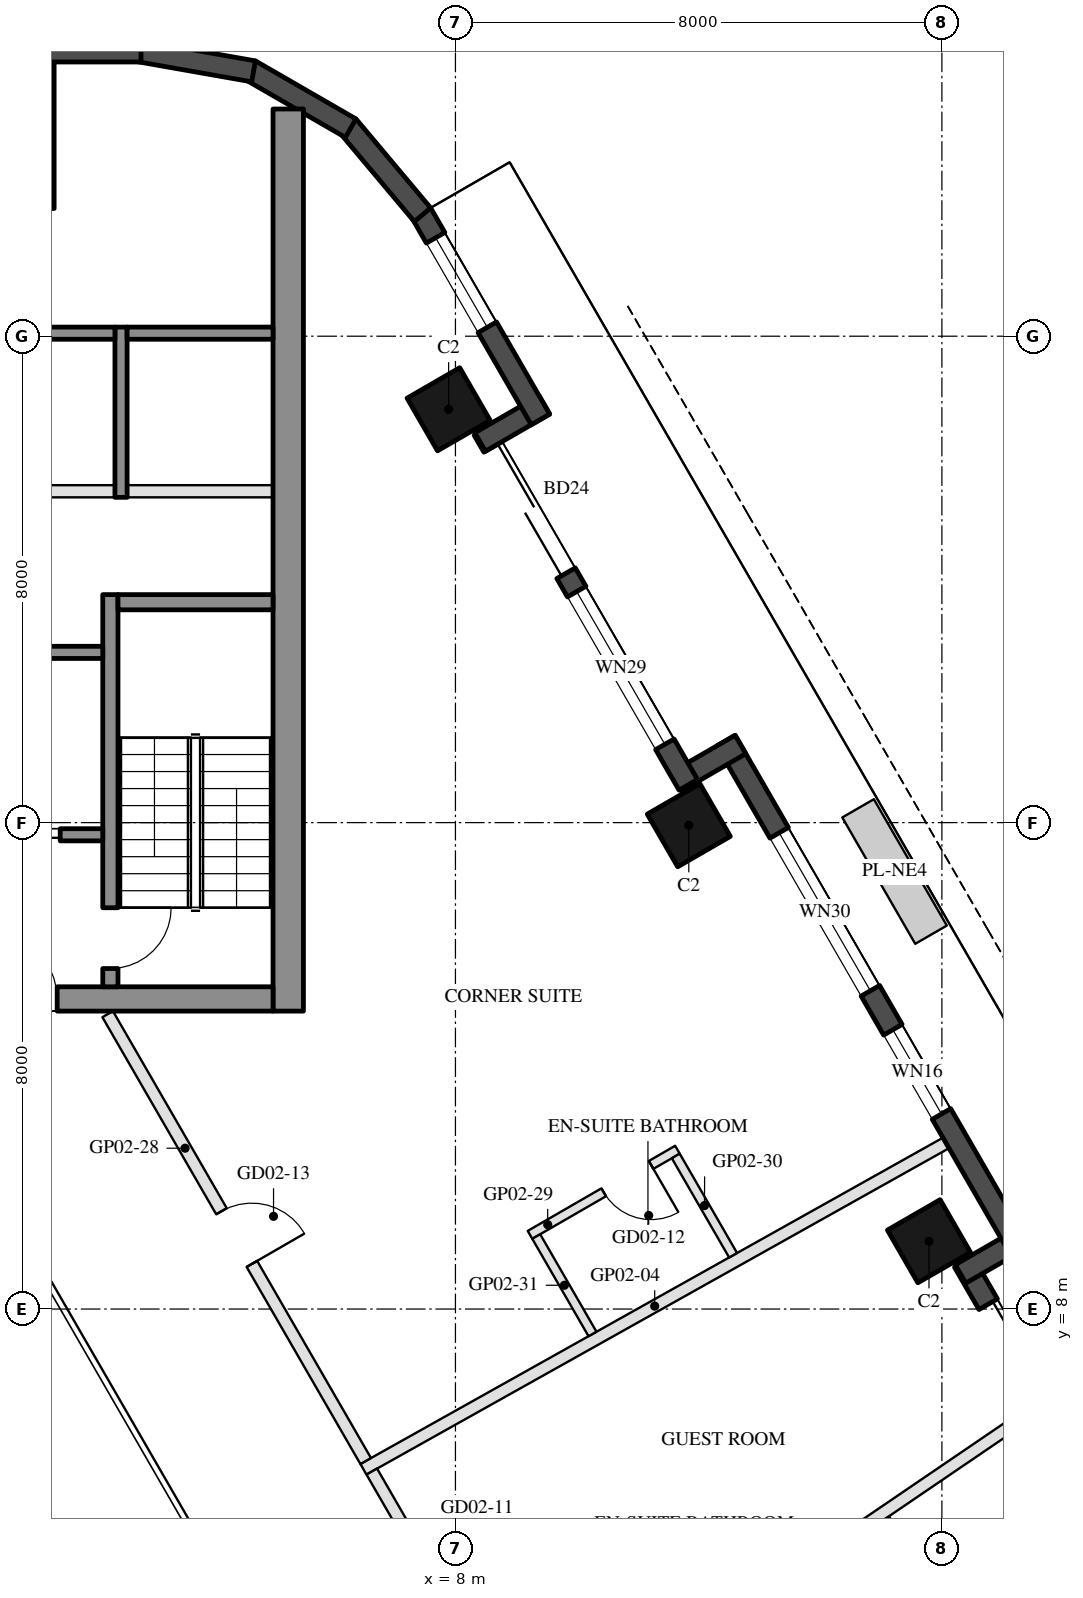
"""IFC4 building model, lengths in metres.
Left out: names, types, materials, properties, quantities, classifications, styles, units other than length and angle.
Written with IfcOpenShell. Run it as: python <this file> out.ifc"""

import sys

from ifc_helpers import new_model, si_unit, direction, frame, frame_2d, origin, origin_2d, place, context, subcontext, project, spatial, rectangle, hollow_rectangle, extrude, element, fill, save


model = new_model("IFC4")
c1 = context("Model", 3, precision=1e-05, world=origin(), true_north=direction((0.0, 1.0)))
c2 = subcontext(c1, "Body", "Model", "MODEL_VIEW")
j1 = project(units=[si_unit("LENGTHUNIT", "METRE"), si_unit("PLANEANGLEUNIT", "RADIAN")], contexts=[c1])
p1 = place(None, origin())
s1 = spatial("IfcSite", under=j1, at=p1, CompositionType="ELEMENT")
p2 = place(p1, origin())
s2 = spatial("IfcBuilding", under=s1, at=p2, CompositionType="ELEMENT")
p3 = place(p2, frame((0.0, 0.0, 57.6)))
s3 = spatial("IfcBuildingStorey", under=s2, at=p3, CompositionType="ELEMENT", Elevation=57.6)
for number, where, z_axis, x_axis in (
    (1, (15.788, 9.115, 0.0), (0.0, 0.0, 1.0), (-0.5, 0.866, 0.0)),
    (2, (11.838, 15.957, 0.0), (0.0, 0.0, 1.0), (-0.5, 0.866, 0.0)),
    (3, (7.888, 22.798, 0.0), (0.0, 0.0, 1.0), (-0.5, 0.866, 0.0)),
):
    element("IfcColumn", number, at=place(p3, frame(where, z_axis=z_axis, x_axis=x_axis)), inside=s3, PredefinedType="COLUMN", context=c2, shape_type="SweptSolid", body=[
        extrude(hollow_rectangle(XDim=1.0, YDim=1.0, WallThickness=0.045, at=origin_2d()), origin(), (0.0, 0.0, 1.0), 3.7),
    ])
p4 = place(p3, frame((0.0, 27.3, 0.0), z_axis=(0.0, 0.0, 1.0), x_axis=(1.0, 0.0, 0.0)))
e4 = element("IfcColumn", 4, at=p4, inside=s3, PredefinedType="COLUMN", context=c2, shape_type="SweptSolid", body=[
    extrude(hollow_rectangle(XDim=2.8, YDim=2.4, WallThickness=0.07, at=origin_2d()), origin(), (0.0, 0.0, 1.0), 3.7),
])
p5 = place(p3, frame((19.729, 2.938, 0.0), z_axis=(0.0, 0.0, 1.0), x_axis=(-0.499976430342, 0.866039011305, 0.0)))
e5 = element("IfcWall", 5, at=p5, inside=s3, PredefinedType="SOLIDWALL", context=c2, shape_type="SweptSolid", body=[
    extrude(rectangle(XDim=6.74, YDim=0.35, at=frame_2d((3.37, 0.0))), origin(), (0.0, 0.0, 1.0), 3.55),
])
p6 = place(p5, frame((0.77, 0.0, 0.3)))
e6 = element("IfcOpeningElement", 6, at=p6, cuts=e5, PredefinedType="OPENING", context=c2, shape_type="SweptSolid", body=[
    extrude(rectangle(XDim=2.8, YDim=2.65, at=frame_2d((1.4, 1.325))), frame((0.0, 0.185, 0.0), z_axis=(0.0, -1.0, 0.0), x_axis=(1.0, 0.0, 0.0)), (0.0, 0.0, 1.0), 0.37),
])
p7 = place(p5, frame((4.536, 0.0, 0.0)))
e7 = element("IfcOpeningElement", 7, at=p7, cuts=e5, PredefinedType="OPENING", context=c2, shape_type="SweptSolid", body=[
    extrude(rectangle(XDim=1.4, YDim=2.4, at=frame_2d((0.7, 1.2))), frame((0.0, 0.185, 0.0), z_axis=(0.0, -1.0, 0.0), x_axis=(1.0, 0.0, 0.0)), (0.0, 0.0, 1.0), 0.37),
])
p8 = place(p3, frame((16.306, 8.577, 0.0), z_axis=(0.0, 0.0, 1.0), x_axis=(0.866092288191, 0.499884134912, 0.0)))
e8 = element("IfcWall", 8, at=p8, inside=s3, PredefinedType="SOLIDWALL", context=c2, shape_type="SweptSolid", body=[
    extrude(rectangle(XDim=1.22, YDim=0.35, at=frame_2d((0.61, 0.0))), origin(), (0.0, 0.0, 1.0), 3.55),
])
p9 = place(p3, frame((17.299, 8.948, 0.0), z_axis=(0.0, 0.0, 1.0), x_axis=(-0.500010041276, 0.866019606374, 0.0)))
e9 = element("IfcWall", 9, at=p9, inside=s3, PredefinedType="SOLIDWALL", context=c2, shape_type="SweptSolid", body=[
    extrude(rectangle(XDim=9.7, YDim=0.35, at=frame_2d((4.85, 0.0))), origin(), (0.0, 0.0, 1.0), 3.55),
])
p10 = place(p9, frame((2.61, 0.0, 0.3)))
e10 = element("IfcOpeningElement", 10, at=p10, cuts=e9, PredefinedType="OPENING", context=c2, shape_type="SweptSolid", body=[
    extrude(rectangle(XDim=1.6, YDim=2.65, at=frame_2d((0.8, 1.325))), frame((0.0, 0.185, 0.0), z_axis=(0.0, -1.0, 0.0), x_axis=(1.0, 0.0, 0.0)), (0.0, 0.0, 1.0), 0.37),
])
p11 = place(p9, frame((4.949, 0.0, 0.3)))
e11 = element("IfcOpeningElement", 11, at=p11, cuts=e9, PredefinedType="OPENING", context=c2, shape_type="SweptSolid", body=[
    extrude(rectangle(XDim=3.0, YDim=2.65, at=frame_2d((1.5, 1.325))), frame((0.0, 0.185, 0.0), z_axis=(0.0, -1.0, 0.0), x_axis=(1.0, 0.0, 0.0)), (0.0, 0.0, 1.0), 0.37),
])
p12 = place(p3, frame((12.688, 17.284, 0.0), z_axis=(0.0, 0.0, 1.0), x_axis=(-0.865955602162, -0.500120880472, 0.0)))
e12 = element("IfcWall", 12, at=p12, inside=s3, PredefinedType="SOLIDWALL", context=c2, shape_type="SweptSolid", body=[
    extrude(rectangle(XDim=1.22, YDim=0.35, at=frame_2d((0.61, 0.0))), origin(), (0.0, 0.0, 1.0), 3.55),
])
p13 = place(p3, frame((11.829, 16.621, 0.0), z_axis=(0.0, 0.0, 1.0), x_axis=(-0.500003597184, 0.866023326939, 0.0)))
e13 = element("IfcWall", 13, at=p13, inside=s3, PredefinedType="SOLIDWALL", context=c2, shape_type="SweptSolid", body=[
    extrude(rectangle(XDim=6.74, YDim=0.35, at=frame_2d((3.37, 0.0))), origin(), (0.0, 0.0, 1.0), 3.55),
])
p14 = place(p13, frame((4.02, 0.0, 0.0)))
e14 = element("IfcOpeningElement", 14, at=p14, cuts=e13, PredefinedType="OPENING", context=c2, shape_type="SweptSolid", body=[
    extrude(rectangle(XDim=2.4, YDim=2.4, at=frame_2d((1.2, 1.2))), frame((0.0, 0.185, 0.0), z_axis=(0.0, -1.0, 0.0), x_axis=(1.0, 0.0, 0.0)), (0.0, 0.0, 1.0), 0.37),
])
p15 = place(p13, frame((0.77, 0.0, 0.3)))
e15 = element("IfcOpeningElement", 15, at=p15, cuts=e13, PredefinedType="OPENING", context=c2, shape_type="SweptSolid", body=[
    extrude(rectangle(XDim=2.9, YDim=2.65, at=frame_2d((1.45, 1.325))), frame((0.0, 0.185, 0.0), z_axis=(0.0, -1.0, 0.0), x_axis=(1.0, 0.0, 0.0)), (0.0, 0.0, 1.0), 0.37),
])
p16 = place(p3, frame((8.406, 22.26, 0.0), z_axis=(0.0, 0.0, 1.0), x_axis=(0.865955602162, 0.500120880472, 0.0)))
e16 = element("IfcWall", 16, at=p16, inside=s3, PredefinedType="SOLIDWALL", context=c2, shape_type="SweptSolid", body=[
    extrude(rectangle(XDim=1.22, YDim=0.35, at=frame_2d((0.61, 0.0))), origin(), (0.0, 0.0, 1.0), 3.55),
])
p17 = place(p3, frame((9.398, 22.631, 0.0), z_axis=(0.0, 0.0, 1.0), x_axis=(-0.499954521343, 0.866051659307, 0.0)))
e17 = element("IfcWall", 17, at=p17, inside=s3, PredefinedType="SOLIDWALL", context=c2, shape_type="SweptSolid", body=[
    extrude(rectangle(XDim=3.916, YDim=0.35, at=frame_2d((1.958, 0.0))), origin(), (0.0, 0.0, 1.0), 3.55),
])
p18 = place(p17, frame((1.75, 0.0, 0.3)))
e18 = element("IfcOpeningElement", 18, at=p18, cuts=e17, PredefinedType="OPENING", context=c2, shape_type="SweptSolid", body=[
    extrude(rectangle(XDim=1.7, YDim=2.65, at=frame_2d((0.85, 1.325))), frame((0.0, 0.185, 0.0), z_axis=(0.0, -1.0, 0.0), x_axis=(1.0, 0.0, 0.0)), (0.0, 0.0, 1.0), 0.37),
])
p19 = place(p3, frame((7.458, 25.998, 0.0), z_axis=(0.0, 0.0, 1.0), x_axis=(-0.642808304945, 0.766027077259, 0.0)))
e19 = element("IfcWall", 19, at=p19, inside=s3, PredefinedType="SOLIDWALL", context=c2, shape_type="SweptSolid", body=[
    extrude(rectangle(XDim=1.91, YDim=0.35, at=frame_2d((0.955, 0.0))), origin(), (0.0, 0.0, 1.0), 3.55),
])
for number, where, z_axis, x_axis in (
    (20, (6.277, 27.422, 0.0), (0.0, 0.0, 1.0), (-0.866, 0.5, 0.0)),
    (21, (4.68, 28.356, 0.0), (0.0, 0.0, 1.0), (-0.985, 0.174, 0.0)),
):
    element("IfcWall", number, at=place(p3, frame(where, z_axis=z_axis, x_axis=x_axis)), inside=s3, PredefinedType="SOLIDWALL", context=c2, shape_type="SweptSolid", body=[
        extrude(rectangle(XDim=1.91, YDim=0.35, at=frame_2d((0.955, 0.0))), origin(), (0.0, 0.0, 1.0), 3.55),
    ])
p20 = place(p3, frame((2.829, 28.685, 0.0), z_axis=(0.0, 0.0, 1.0), x_axis=(-1.0, 0.0, 0.0)))
e22 = element("IfcWall", 22, at=p20, inside=s3, PredefinedType="SOLIDWALL", context=c2, shape_type="SweptSolid", body=[
    extrude(rectangle(XDim=5.658, YDim=0.35, at=frame_2d((2.829, 0.0))), origin(), (0.0, 0.0, 1.0), 3.55),
])
p21 = place(p3, frame((5.25, 12.9, 0.0), z_axis=(0.0, 0.0, 1.0), x_axis=(0.0, 1.0, 0.0)))
e23 = element("IfcWall", 23, at=p21, inside=s3, PredefinedType="SHEAR", context=c2, shape_type="SweptSolid", body=[
    extrude(rectangle(XDim=14.837, YDim=0.5, at=frame_2d((7.418, 0.0))), origin(), (0.0, 0.0, 1.0), 3.5),
])
p22 = place(p3, frame((5.0, 13.1, 0.0), z_axis=(0.0, 0.0, 1.0), x_axis=(-1.0, 0.0, 0.0)))
e24 = element("IfcWall", 24, at=p22, inside=s3, PredefinedType="SHEAR", context=c2, shape_type="SweptSolid", body=[
    extrude(rectangle(XDim=10.0, YDim=0.4, at=frame_2d((5.0, 0.0))), origin(), (0.0, 0.0, 1.0), 3.5),
])
p23 = place(p22, frame((3.55, 0.0, 0.0)))
e25 = element("IfcOpeningElement", 25, at=p23, cuts=e24, PredefinedType="OPENING", context=c2, shape_type="SweptSolid", body=[
    extrude(rectangle(XDim=1.1, YDim=2.1, at=frame_2d((0.55, 1.05))), frame((0.0, 0.21, 0.0), z_axis=(0.0, -1.0, 0.0), x_axis=(1.0, 0.0, 0.0)), (0.0, 0.0, 1.0), 0.42),
])
p24 = place(p22, frame((5.85, 0.0, 0.0)))
e26 = element("IfcOpeningElement", 26, at=p24, cuts=e24, PredefinedType="OPENING", context=c2, shape_type="SweptSolid", body=[
    extrude(rectangle(XDim=1.4, YDim=2.1, at=frame_2d((0.7, 1.05))), frame((0.0, 0.21, 0.0), z_axis=(0.0, -1.0, 0.0), x_axis=(1.0, 0.0, 0.0)), (0.0, 0.0, 1.0), 0.42),
])
p25 = place(p3, frame((2.325, 13.3, 0.0), z_axis=(0.0, 0.0, 1.0), x_axis=(0.0, 1.0, 0.0)))
e27 = element("IfcWall", 27, at=p25, inside=s3, PredefinedType="SHEAR", context=c2, shape_type="SweptSolid", body=[
    extrude(rectangle(XDim=6.45, YDim=0.25, at=frame_2d((3.225, 0.0))), origin(), (0.0, 0.0, 1.0), 3.5),
])
p26 = place(p25, frame((0.3, 0.0, 0.0)))
e28 = element("IfcOpeningElement", 28, at=p26, cuts=e27, PredefinedType="OPENING", context=c2, shape_type="SweptSolid", body=[
    extrude(rectangle(XDim=1.0, YDim=2.1, at=frame_2d((0.5, 1.05))), frame((0.0, 0.135, 0.0), z_axis=(0.0, -1.0, 0.0), x_axis=(1.0, 0.0, 0.0)), (0.0, 0.0, 1.0), 0.27),
])
p27 = place(p3, frame((5.0, 19.625, 0.0), z_axis=(0.0, 0.0, 1.0), x_axis=(-1.0, 0.0, 0.0)))
e29 = element("IfcWall", 29, at=p27, inside=s3, PredefinedType="SHEAR", context=c2, shape_type="SweptSolid", body=[
    extrude(rectangle(XDim=2.55, YDim=0.25, at=frame_2d((1.275, 0.0))), origin(), (0.0, 0.0, 1.0), 3.5),
])
p28 = place(p3, frame((2.2, 18.8, 0.0), z_axis=(0.0, 0.0, 1.0), x_axis=(-1.0, 0.0, 0.0)))
e30 = element("IfcWall", 30, at=p28, inside=s3, PredefinedType="SHEAR", context=c2, shape_type="SweptSolid", body=[
    extrude(rectangle(XDim=2.8, YDim=0.2, at=frame_2d((1.4, 0.0))), origin(), (0.0, 0.0, 1.0), 3.5),
])
p29 = place(p3, frame((2.2, 15.8, 0.0), z_axis=(0.0, 0.0, 1.0), x_axis=(-1.0, 0.0, 0.0)))
e31 = element("IfcWall", 31, at=p29, inside=s3, PredefinedType="SHEAR", context=c2, shape_type="SweptSolid", body=[
    extrude(rectangle(XDim=2.8, YDim=0.2, at=frame_2d((1.4, 0.0))), origin(), (0.0, 0.0, 1.0), 3.5),
])
p30 = place(p29, frame((0.7, 0.0, 0.0)))
e32 = element("IfcOpeningElement", 32, at=p30, cuts=e31, PredefinedType="OPENING", context=c2, shape_type="SweptSolid", body=[
    extrude(rectangle(XDim=1.2, YDim=2.1, at=frame_2d((0.6, 1.05))), frame((0.0, 0.11, 0.0), z_axis=(0.0, -1.0, 0.0), x_axis=(1.0, 0.0, 0.0)), (0.0, 0.0, 1.0), 0.22),
])
p31 = place(p3, frame((2.5, 21.35, 0.0), z_axis=(0.0, 0.0, 1.0), x_axis=(0.0, 1.0, 0.0)))
e33 = element("IfcWall", 33, at=p31, inside=s3, PredefinedType="SHEAR", context=c2, shape_type="SweptSolid", body=[
    extrude(rectangle(XDim=2.8, YDim=0.2, at=frame_2d((1.4, 0.0))), origin(), (0.0, 0.0, 1.0), 3.5),
])
p32 = place(p3, frame((5.0, 24.05, 0.0), z_axis=(0.0, 0.0, 1.0), x_axis=(-1.0, 0.0, 0.0)))
e34 = element("IfcWall", 34, at=p32, inside=s3, PredefinedType="SHEAR", context=c2, shape_type="SweptSolid", body=[
    extrude(rectangle(XDim=2.4, YDim=0.2, at=frame_2d((1.2, 0.0))), origin(), (0.0, 0.0, 1.0), 3.5),
])
p33 = place(p3, frame((2.4, 24.05, 0.0), z_axis=(0.0, 0.0, 1.0), x_axis=(-1.0, 0.0, 0.0)))
e35 = element("IfcWall", 35, at=p33, inside=s3, PredefinedType="SHEAR", context=c2, shape_type="SweptSolid", body=[
    extrude(rectangle(XDim=2.8, YDim=0.2, at=frame_2d((1.4, 0.0))), origin(), (0.0, 0.0, 1.0), 3.5),
])
p34 = place(p3, frame((5.0, 21.45, 0.0), z_axis=(0.0, 0.0, 1.0), x_axis=(-1.0, 0.0, 0.0)))
e36 = element("IfcWall", 36, at=p34, inside=s3, PredefinedType="PARTITIONING", context=c2, shape_type="SweptSolid", body=[
    extrude(rectangle(XDim=2.4, YDim=0.2, at=frame_2d((1.2, 0.0))), origin(), (0.0, 0.0, 1.0), 3.5),
])
p35 = place(p3, frame((2.4, 21.45, 0.0), z_axis=(0.0, 0.0, 1.0), x_axis=(-1.0, 0.0, 0.0)))
e37 = element("IfcWall", 37, at=p35, inside=s3, PredefinedType="PARTITIONING", context=c2, shape_type="SweptSolid", body=[
    extrude(rectangle(XDim=2.8, YDim=0.2, at=frame_2d((1.4, 0.0))), origin(), (0.0, 0.0, 1.0), 3.5),
])
p36 = place(p3, frame((17.551, 6.361, 0.0), z_axis=(0.0, 0.0, 1.0), x_axis=(-0.826656859261, -0.562706350627, 0.0)))
e38 = element("IfcWall", 38, at=p36, inside=s3, PredefinedType="PARTITIONING", context=c2, shape_type="SweptSolid", body=[
    extrude(rectangle(XDim=10.108, YDim=0.2, at=frame_2d((5.054, 0.0))), origin(), (0.0, 0.0, 1.0), 2.95),
])
p37 = place(p3, frame((16.067, 10.731, 0.0), z_axis=(0.0, 0.0, 1.0), x_axis=(-0.872443451626, -0.488715074164, 0.0)))
e39 = element("IfcWall", 39, at=p37, inside=s3, PredefinedType="PARTITIONING", context=c2, shape_type="SweptSolid", body=[
    extrude(rectangle(XDim=10.981, YDim=0.2, at=frame_2d((5.49, 0.0))), origin(), (0.0, 0.0, 1.0), 2.96),
])
p38 = place(p3, frame((16.095, 2.773, 0.0), z_axis=(0.0, 0.0, 1.0), x_axis=(-0.499990189338, 0.866031067899, 0.0)))
e40 = element("IfcWall", 40, at=p38, inside=s3, PredefinedType="PARTITIONING", context=c2, shape_type="SweptSolid", body=[
    extrude(rectangle(XDim=2.052, YDim=0.15, at=frame_2d((1.026, 0.0))), origin(), (0.0, 0.0, 1.0), 2.95),
])
p39 = place(p3, frame((6.624, 5.327, 0.0), z_axis=(0.0, 0.0, 1.0), x_axis=(0.500015953014, -0.866016193112, 0.0)))
e41 = element("IfcWall", 41, at=p39, inside=s3, PredefinedType="PARTITIONING", context=c2, shape_type="SweptSolid", body=[
    extrude(rectangle(XDim=5.208, YDim=0.2, at=frame_2d((2.604, 0.0))), origin(), (0.0, 0.0, 1.0), 2.95),
])
p40 = place(p39, frame((1.751, 0.0, 0.0)))
e42 = element("IfcOpeningElement", 42, at=p40, cuts=e41, PredefinedType="OPENING", context=c2, shape_type="SweptSolid", body=[
    extrude(rectangle(XDim=1.0, YDim=2.1, at=frame_2d((0.5, 1.05))), frame((0.0, 0.11, 0.0), z_axis=(0.0, -1.0, 0.0), x_axis=(1.0, 0.0, 0.0)), (0.0, 0.0, 1.0), 0.22),
])
p41 = place(p3, frame((2.281, 12.85, 0.0), z_axis=(0.0, 0.0, 1.0), x_axis=(0.499997198377, -0.866027021296, 0.0)))
e43 = element("IfcWall", 43, at=p41, inside=s3, PredefinedType="PARTITIONING", context=c2, shape_type="SweptSolid", body=[
    extrude(rectangle(XDim=8.487, YDim=0.2, at=frame_2d((4.243, 0.0))), origin(), (0.0, 0.0, 1.0), 2.95),
])
p42 = place(p41, frame((3.743, 0.0, 0.0)))
e44 = element("IfcOpeningElement", 44, at=p42, cuts=e43, PredefinedType="OPENING", context=c2, shape_type="SweptSolid", body=[
    extrude(rectangle(XDim=1.0, YDim=2.1, at=frame_2d((0.5, 1.05))), frame((0.0, 0.11, 0.0), z_axis=(0.0, -1.0, 0.0), x_axis=(1.0, 0.0, 0.0)), (0.0, 0.0, 1.0), 0.22),
])
p43 = place(p3, frame((11.651, 10.62, 0.0), z_axis=(0.0, 0.0, 1.0), x_axis=(-0.865996816683, -0.500049511043, 0.0)))
e45 = element("IfcWall", 45, at=p43, inside=s3, PredefinedType="PARTITIONING", context=c2, shape_type="SweptSolid", body=[
    extrude(rectangle(XDim=2.8, YDim=0.15, at=frame_2d((1.4, 0.0))), origin(), (0.0, 0.0, 1.0), 3.55),
])
p44 = place(p43, frame((0.5, 0.0, 0.0)))
e46 = element("IfcOpeningElement", 46, at=p44, cuts=e45, PredefinedType="OPENING", context=c2, shape_type="SweptSolid", body=[
    extrude(rectangle(XDim=0.9, YDim=2.1, at=frame_2d((0.45, 1.05))), frame((0.0, 0.085, 0.0), z_axis=(0.0, -1.0, 0.0), x_axis=(1.0, 0.0, 0.0)), (0.0, 0.0, 1.0), 0.17),
])
p45 = place(p3, frame((12.566, 8.885, 0.0), z_axis=(0.0, 0.0, 1.0), x_axis=(-0.499969057507, 0.866043267704, 0.0)))
e47 = element("IfcWall", 47, at=p45, inside=s3, PredefinedType="PARTITIONING", context=c2, shape_type="SweptSolid", body=[
    extrude(rectangle(XDim=1.885, YDim=0.15, at=frame_2d((0.943, 0.0))), origin(), (0.0, 0.0, 1.0), 3.55),
])
p46 = place(p3, frame((10.254, 7.59, 0.0), z_axis=(0.0, 0.0, 1.0), x_axis=(-0.499912756669, 0.866075767886, 0.0)))
e48 = element("IfcWall", 48, at=p46, inside=s3, PredefinedType="PARTITIONING", context=c2, shape_type="SweptSolid", body=[
    extrude(rectangle(XDim=1.851, YDim=0.15, at=frame_2d((0.925, 0.0))), origin(), (0.0, 0.0, 1.0), 3.55),
])
p47 = place(p7, frame((1.4, 0.0, 0.0), z_axis=(0.0, 0.0, 1.0), x_axis=(-1.0, 0.0, 0.0)))
e49 = element("IfcDoor", 49, at=p47, inside=s3, OperationType="SLIDING_TO_LEFT", PredefinedType="DOOR", context=c2, shape_type="SweptSolid", body=[
    extrude(rectangle(XDim=1.4, YDim=2.4, at=frame_2d((0.7, 1.2))), frame((0.0, 0.025, 0.0), z_axis=(0.0, -1.0, 0.0), x_axis=(1.0, 0.0, 0.0)), (0.0, 0.0, 1.0), 0.05),
])
fill(e7, e49)
p48 = place(p10, origin())
e50 = element("IfcWindow", 50, at=p48, inside=s3, PartitioningType="SINGLE_PANEL", PredefinedType="WINDOW", context=c2, shape_type="SweptSolid", body=[
    extrude(rectangle(XDim=1.6, YDim=2.65, at=frame_2d((0.8, 1.325))), frame((0.0, 0.03, 0.0), z_axis=(0.0, -1.0, 0.0), x_axis=(1.0, 0.0, 0.0)), (0.0, 0.0, 1.0), 0.06),
])
fill(e10, e50)
p49 = place(p11, origin())
e51 = element("IfcWindow", 51, at=p49, inside=s3, PartitioningType="SINGLE_PANEL", PredefinedType="WINDOW", context=c2, shape_type="SweptSolid", body=[
    extrude(rectangle(XDim=3.0, YDim=2.65, at=frame_2d((1.5, 1.325))), frame((0.0, 0.03, 0.0), z_axis=(0.0, -1.0, 0.0), x_axis=(1.0, 0.0, 0.0)), (0.0, 0.0, 1.0), 0.06),
])
fill(e11, e51)
p50 = place(p14, frame((2.4, 0.0, 0.0), z_axis=(0.0, 0.0, 1.0), x_axis=(-1.0, 0.0, 0.0)))
e52 = element("IfcDoor", 52, at=p50, inside=s3, OperationType="SLIDING_TO_LEFT", PredefinedType="DOOR", context=c2, shape_type="SweptSolid", body=[
    extrude(rectangle(XDim=2.4, YDim=2.4, at=frame_2d((1.2, 1.2))), frame((0.0, 0.025, 0.0), z_axis=(0.0, -1.0, 0.0), x_axis=(1.0, 0.0, 0.0)), (0.0, 0.0, 1.0), 0.05),
])
fill(e14, e52)
p51 = place(p15, origin())
e53 = element("IfcWindow", 53, at=p51, inside=s3, PartitioningType="SINGLE_PANEL", PredefinedType="WINDOW", context=c2, shape_type="SweptSolid", body=[
    extrude(rectangle(XDim=2.9, YDim=2.65, at=frame_2d((1.45, 1.325))), frame((0.0, 0.03, 0.0), z_axis=(0.0, -1.0, 0.0), x_axis=(1.0, 0.0, 0.0)), (0.0, 0.0, 1.0), 0.06),
])
fill(e15, e53)
p52 = place(p18, origin())
e54 = element("IfcWindow", 54, at=p52, inside=s3, PartitioningType="SINGLE_PANEL", PredefinedType="WINDOW", context=c2, shape_type="SweptSolid", body=[
    extrude(rectangle(XDim=1.7, YDim=2.65, at=frame_2d((0.85, 1.325))), frame((0.0, 0.03, 0.0), z_axis=(0.0, -1.0, 0.0), x_axis=(1.0, 0.0, 0.0)), (0.0, 0.0, 1.0), 0.06),
])
fill(e18, e54)
p53 = place(p30, origin())
e55 = element("IfcDoor", 55, at=p53, inside=s3, OperationType="DOUBLE_DOOR_SLIDING", PredefinedType="DOOR", context=c2, shape_type="SweptSolid", body=[
    extrude(rectangle(XDim=1.2, YDim=2.1, at=frame_2d((0.6, 1.05))), frame((0.0, 0.025, 0.0), z_axis=(0.0, -1.0, 0.0), x_axis=(1.0, 0.0, 0.0)), (0.0, 0.0, 1.0), 0.05),
])
fill(e32, e55)
p54 = place(p23, frame((1.1, 0.0, 0.0), z_axis=(0.0, 0.0, 1.0), x_axis=(-1.0, 0.0, 0.0)))
e56 = element("IfcDoor", 56, at=p54, inside=s3, OperationType="SINGLE_SWING_LEFT", PredefinedType="DOOR", context=c2, shape_type="SweptSolid", body=[
    extrude(rectangle(XDim=1.1, YDim=2.1, at=frame_2d((0.55, 1.05))), frame((0.0, 0.025, 0.0), z_axis=(0.0, -1.0, 0.0), x_axis=(1.0, 0.0, 0.0)), (0.0, 0.0, 1.0), 0.05),
])
fill(e25, e56)
p55 = place(p26, frame((1.0, 0.0, 0.0), z_axis=(0.0, 0.0, 1.0), x_axis=(-1.0, 0.0, 0.0)))
e57 = element("IfcDoor", 57, at=p55, inside=s3, OperationType="SINGLE_SWING_LEFT", PredefinedType="DOOR", context=c2, shape_type="SweptSolid", body=[
    extrude(rectangle(XDim=1.0, YDim=2.1, at=frame_2d((0.5, 1.05))), frame((0.0, 0.025, 0.0), z_axis=(0.0, -1.0, 0.0), x_axis=(1.0, 0.0, 0.0)), (0.0, 0.0, 1.0), 0.05),
])
fill(e28, e57)
p56 = place(p44, origin())
e58 = element("IfcDoor", 58, at=p56, inside=s3, OperationType="SINGLE_SWING_LEFT", PredefinedType="DOOR", context=c2, shape_type="SweptSolid", body=[
    extrude(rectangle(XDim=0.9, YDim=2.1, at=frame_2d((0.45, 1.05))), frame((0.0, 0.025, 0.0), z_axis=(0.0, -1.0, 0.0), x_axis=(1.0, 0.0, 0.0)), (0.0, 0.0, 1.0), 0.05),
])
fill(e46, e58)
p57 = place(p42, origin())
e59 = element("IfcDoor", 59, at=p57, inside=s3, OperationType="SINGLE_SWING_RIGHT", PredefinedType="DOOR", context=c2, shape_type="SweptSolid", body=[
    extrude(rectangle(XDim=1.0, YDim=2.1, at=frame_2d((0.5, 1.05))), frame((0.0, 0.025, 0.0), z_axis=(0.0, -1.0, 0.0), x_axis=(1.0, 0.0, 0.0)), (0.0, 0.0, 1.0), 0.05),
])
fill(e44, e59)
save(model, sys.argv[1])
